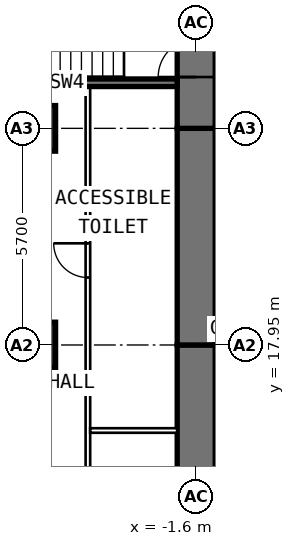
"""IFC4 building model, lengths in metres.
Left out: names, types, materials, properties, quantities, classifications, styles, units other than length and angle.
Written with IfcOpenShell. Run it as: python <this file> out.ifc"""

import sys

from ifc_helpers import new_model, si_unit, direction, frame, frame_2d, origin, origin_2d, place, context, subcontext, project, spatial, rectangle, extrude, element, fill, save


model = new_model("IFC4")
c1 = context("Model", 3, precision=1e-05, world=origin(), true_north=direction((0.0, 1.0)))
c2 = subcontext(c1, "Body", "Model", "MODEL_VIEW")
j1 = project(units=[si_unit("LENGTHUNIT", "METRE"), si_unit("PLANEANGLEUNIT", "RADIAN")], contexts=[c1])
p1 = place(None, origin())
s1 = spatial("IfcSite", under=j1, at=p1, CompositionType="ELEMENT")
p2 = place(p1, origin())
s2 = spatial("IfcBuilding", under=s1, at=p2, CompositionType="ELEMENT")
p3 = place(p2, frame((0.0, 0.0, 25.2)))
s3 = spatial("IfcBuildingStorey", under=s2, at=p3, CompositionType="ELEMENT", Elevation=25.2)
for number, where, z_axis, x_axis in (
    (1, (-5.9, 17.95, 0.0), (0.0, 0.0, 1.0), (0.0, 1.0, 0.0)),
    (2, (-5.9, 23.65, 0.0), (0.0, 0.0, 1.0), (0.0, 1.0, 0.0)),
):
    element("IfcColumn", number, at=place(p3, frame(where, z_axis=z_axis, x_axis=x_axis)), inside=s3, PredefinedType="COLUMN", context=c2, shape_type="SweptSolid", body=[
        extrude(rectangle(XDim=1.2, YDim=1.2, at=origin_2d()), origin(), (0.0, 0.0, 1.0), 3.6),
    ])
p4 = place(p3, frame((-1.6, 9.6, 0.0), z_axis=(0.0, 0.0, 1.0), x_axis=(0.0, 1.0, 0.0)))
e3 = element("IfcWall", 3, at=p4, inside=s3, PredefinedType="SHEAR", context=c2, shape_type="SweptSolid", body=[
    extrude(rectangle(XDim=8.35, YDim=1.0, at=frame_2d((4.175, 0.0))), origin(), (0.0, 0.0, 1.0), 3.6),
])
p5 = place(p4, frame((1.3, 0.0, 0.0)))
e4 = element("IfcOpeningElement", 4, at=p5, cuts=e3, PredefinedType="OPENING", context=c2, shape_type="SweptSolid", body=[
    extrude(rectangle(XDim=1.0, YDim=2.1, at=frame_2d((0.5, 1.05))), frame((0.0, 0.512, 0.0), z_axis=(0.0, -1.0, 0.0), x_axis=(1.0, 0.0, 0.0)), (0.0, 0.0, 1.0), 1.024),
])
p6 = place(p3, frame((-1.6, 17.95, 0.0), z_axis=(0.0, 0.0, 1.0), x_axis=(0.0, 1.0, 0.0)))
e5 = element("IfcWall", 5, at=p6, inside=s3, PredefinedType="SHEAR", context=c2, shape_type="SweptSolid", body=[
    extrude(rectangle(XDim=5.7, YDim=1.0, at=frame_2d((2.85, 0.0))), origin(), (0.0, 0.0, 1.0), 3.6),
])
p7 = place(p3, frame((-1.6, 23.65, 0.0), z_axis=(0.0, 0.0, 1.0), x_axis=(0.0, 1.0, 0.0)))
e6 = element("IfcWall", 6, at=p7, inside=s3, PredefinedType="SHEAR", context=c2, shape_type="SweptSolid", body=[
    extrude(rectangle(XDim=10.745, YDim=1.0, at=frame_2d((5.373, 0.0))), origin(), (0.0, 0.0, 1.0), 3.6),
])
p8 = place(p7, frame((1.35, 0.0, 0.0)))
e7 = element("IfcOpeningElement", 7, at=p8, cuts=e6, PredefinedType="OPENING", context=c2, shape_type="SweptSolid", body=[
    extrude(rectangle(XDim=1.0, YDim=2.1, at=frame_2d((0.5, 1.05))), frame((0.0, 0.512, 0.0), z_axis=(0.0, -1.0, 0.0), x_axis=(1.0, 0.0, 0.0)), (0.0, 0.0, 1.0), 1.024),
])
p9 = place(p3, frame((-4.45, 10.1, 0.0), z_axis=(0.0, 0.0, 1.0), x_axis=(0.0, 1.0, 0.0)))
e8 = element("IfcWall", 8, at=p9, inside=s3, PredefinedType="PARTITIONING", context=c2, shape_type="SweptSolid", body=[
    extrude(rectangle(XDim=14.65, YDim=0.12, at=frame_2d((7.325, 0.0))), origin(), (0.0, 0.0, 1.0), 3.35),
])
p10 = place(p9, frame((2.9, 0.0, 0.0)))
e9 = element("IfcOpeningElement", 9, at=p10, cuts=e8, PredefinedType="OPENING", context=c2, shape_type="SweptSolid", body=[
    extrude(rectangle(XDim=0.9, YDim=2.1, at=frame_2d((0.45, 1.05))), frame((0.0, 0.072, 0.0), z_axis=(0.0, -1.0, 0.0), x_axis=(1.0, 0.0, 0.0)), (0.0, 0.0, 1.0), 0.144),
])
p11 = place(p9, frame((9.625, 0.0, 0.0)))
e10 = element("IfcOpeningElement", 10, at=p11, cuts=e8, PredefinedType="OPENING", context=c2, shape_type="SweptSolid", body=[
    extrude(rectangle(XDim=0.9, YDim=2.1, at=frame_2d((0.45, 1.05))), frame((0.0, 0.072, 0.0), z_axis=(0.0, -1.0, 0.0), x_axis=(1.0, 0.0, 0.0)), (0.0, 0.0, 1.0), 0.144),
])
p12 = place(p3, frame((-2.1, 15.7, 0.0), z_axis=(0.0, 0.0, 1.0), x_axis=(-1.0, 0.0, 0.0)))
e11 = element("IfcWall", 11, at=p12, inside=s3, PredefinedType="PARTITIONING", context=c2, shape_type="SweptSolid", body=[
    extrude(rectangle(XDim=2.29, YDim=0.12, at=frame_2d((1.145, 0.0))), origin(), (0.0, 0.0, 1.0), 3.35),
])
p13 = place(p3, frame((-2.1, 24.85, 0.0), z_axis=(0.0, 0.0, 1.0), x_axis=(-1.0, 0.0, 0.0)))
e12 = element("IfcWall", 12, at=p13, inside=s3, PredefinedType="SHEAR", context=c2, shape_type="SweptSolid", body=[
    extrude(rectangle(XDim=5.8, YDim=0.2, at=frame_2d((2.9, 0.0))), origin(), (0.0, 0.0, 1.0), 3.33),
])
p14 = place(p11, origin())
e13 = element("IfcDoor", 13, at=p14, inside=s3, OperationType="SINGLE_SWING_RIGHT", PredefinedType="DOOR", context=c2, shape_type="SweptSolid", body=[
    extrude(rectangle(XDim=0.9, YDim=2.1, at=frame_2d((0.45, 1.05))), frame((0.0, 0.025, 0.0), z_axis=(0.0, -1.0, 0.0), x_axis=(1.0, 0.0, 0.0)), (0.0, 0.0, 1.0), 0.05),
])
fill(e10, e13)
p15 = place(p8, origin())
e14 = element("IfcDoor", 14, at=p15, inside=s3, OperationType="SINGLE_SWING_LEFT", PredefinedType="DOOR", context=c2, shape_type="SweptSolid", body=[
    extrude(rectangle(XDim=1.0, YDim=2.1, at=frame_2d((0.5, 1.05))), frame((0.0, 0.25, 0.0), z_axis=(0.0, -1.0, 0.0), x_axis=(1.0, 0.0, 0.0)), (0.0, 0.0, 1.0), 0.5),
])
fill(e7, e14)
save(model, sys.argv[1])
